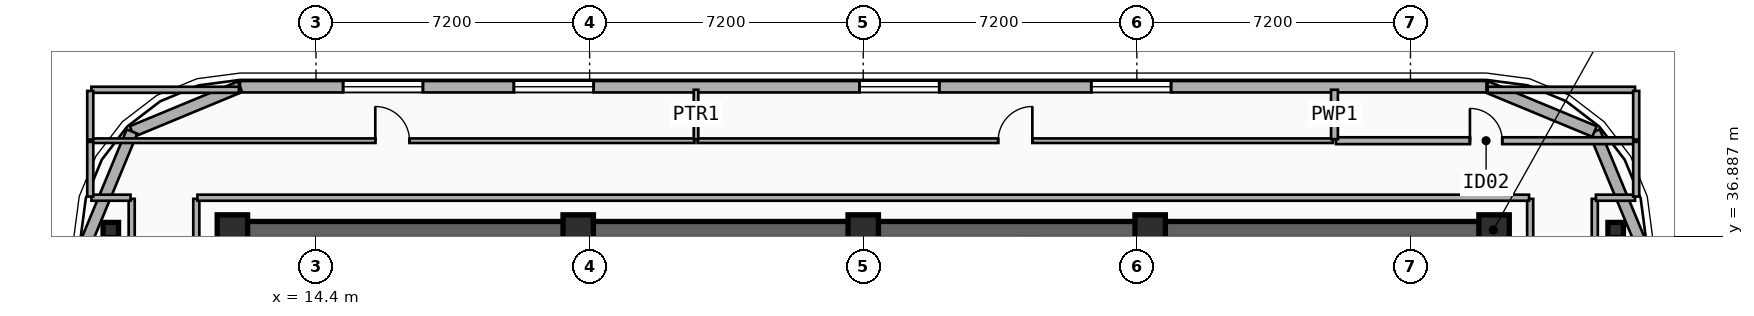
"""IFC4 building model, lengths in metres.
Left out: names, types, materials, properties, quantities, classifications, styles, units other than length and angle.
Written with IfcOpenShell. Run it as: python <this file> out.ifc"""

import sys

from ifc_helpers import new_model, si_unit, direction, frame, frame_2d, origin, origin_2d, place, context, subcontext, project, spatial, rectangle, i_section, extrude, element, fill, save


model = new_model("IFC4")
c1 = context("Model", 3, precision=1e-05, world=origin(), true_north=direction((0.0, 1.0)))
c2 = subcontext(c1, "Body", "Model", "MODEL_VIEW")
j1 = project(units=[si_unit("LENGTHUNIT", "METRE"), si_unit("PLANEANGLEUNIT", "RADIAN")], contexts=[c1])
p1 = place(None, origin())
s1 = spatial("IfcSite", under=j1, at=p1, CompositionType="ELEMENT")
p2 = place(p1, origin())
s2 = spatial("IfcBuilding", under=s1, at=p2, CompositionType="ELEMENT")
p3 = place(p2, frame((0.0, 0.0, 262.1)))
s3 = spatial("IfcBuildingStorey", under=s2, at=p3, CompositionType="ELEMENT", Elevation=262.1)
p4 = place(p3, frame((12.15, 37.05, 0.0), z_axis=(0.0, 0.0, 1.0), x_axis=(1.0, 0.0, 0.0)))
e1 = element("IfcWall", 1, at=p4, inside=s3, PredefinedType="SHEAR", context=c2, shape_type="SweptSolid", body=[
    extrude(rectangle(XDim=33.23, YDim=0.45, at=frame_2d((16.615, 0.0))), origin(), (0.0, 0.0, 1.0), 3.7),
])
for number, where, z_axis, x_axis in (
    (2, (12.2, 37.05, 0.0), (0.0, 0.0, 1.0), (1.0, 0.0, 0.0)),
    (3, (21.3, 37.05, 0.0), (0.0, 0.0, 1.0), (1.0, 0.0, 0.0)),
    (4, (28.8, 37.05, 0.0), (0.0, 0.0, 1.0), (1.0, 0.0, 0.0)),
    (5, (36.35, 37.05, 0.0), (0.0, 0.0, 1.0), (1.0, 0.0, 0.0)),
    (6, (45.4, 37.05, 0.0), (0.0, 0.0, 1.0), (1.0, 0.0, 0.0)),
):
    element("IfcColumn", number, at=place(p3, frame(where, z_axis=z_axis, x_axis=x_axis)), inside=s3, PredefinedType="COLUMN", context=c2, shape_type="SweptSolid", body=[
        extrude(rectangle(XDim=0.8, YDim=0.8, at=origin_2d()), origin(), (0.0, 0.0, 1.0), 3.7),
    ])
for number, where, z_axis, x_axis in (
    (7, (9.0, 37.05, 0.0), (0.0, 0.0, 1.0), (1.0, 0.0, 0.0)),
    (8, (48.6, 37.05, 0.0), (0.0, 0.0, 1.0), (1.0, 0.0, 0.0)),
):
    element("IfcColumn", number, at=place(p3, frame(where, z_axis=z_axis, x_axis=x_axis)), inside=s3, PredefinedType="COLUMN", context=c2, shape_type="SweptSolid", body=[
        extrude(i_section(OverallWidth=0.408, OverallDepth=0.4, WebThickness=0.025, FlangeThickness=0.039, FilletRadius=0.015, at=origin_2d()), origin(), (0.0, 0.0, 1.0), 3.7),
    ])
for number, where, z_axis, x_axis in (
    (9, (48.042, 39.643, 0.0), (0.0, 0.0, 1.0), (0.383, -0.924, 0.0)),
    (10, (45.2, 40.82, 0.0), (0.0, 0.0, 1.0), (0.924, -0.383, 0.0)),
):
    element("IfcWall", number, at=place(p3, frame(where, z_axis=z_axis, x_axis=x_axis)), inside=s3, PredefinedType="SOLIDWALL", context=c2, shape_type="SweptSolid", body=[
        extrude(rectangle(XDim=3.077, YDim=0.3, at=frame_2d((1.538, 0.0))), origin(), (0.0, 0.0, 1.0), 3.42),
    ])
p5 = place(p3, frame((12.4, 40.82, 0.0), z_axis=(0.0, 0.0, 1.0), x_axis=(1.0, 0.0, 0.0)))
e11 = element("IfcWall", 11, at=p5, inside=s3, PredefinedType="SOLIDWALL", context=c2, shape_type="SweptSolid", body=[
    extrude(rectangle(XDim=32.8, YDim=0.3, at=frame_2d((16.4, 0.0))), origin(), (0.0, 0.0, 1.0), 3.42),
])
p6 = place(p5, frame((2.713, 0.0, 0.75)))
e12 = element("IfcOpeningElement", 12, at=p6, cuts=e11, PredefinedType="OPENING", context=c2, shape_type="SweptSolid", body=[
    extrude(rectangle(XDim=2.1, YDim=2.1, at=frame_2d((1.05, 1.05))), frame((0.0, 0.16, 0.0), z_axis=(0.0, -1.0, 0.0), x_axis=(1.0, 0.0, 0.0)), (0.0, 0.0, 1.0), 0.32),
])
p7 = place(p5, frame((7.207, 0.0, 0.75)))
e13 = element("IfcOpeningElement", 13, at=p7, cuts=e11, PredefinedType="OPENING", context=c2, shape_type="SweptSolid", body=[
    extrude(rectangle(XDim=2.1, YDim=2.1, at=frame_2d((1.05, 1.05))), frame((0.0, 0.16, 0.0), z_axis=(0.0, -1.0, 0.0), x_axis=(1.0, 0.0, 0.0)), (0.0, 0.0, 1.0), 0.32),
])
p8 = place(p5, frame((16.3, 0.0, 0.75)))
e14 = element("IfcOpeningElement", 14, at=p8, cuts=e11, PredefinedType="OPENING", context=c2, shape_type="SweptSolid", body=[
    extrude(rectangle(XDim=2.1, YDim=2.1, at=frame_2d((1.05, 1.05))), frame((0.0, 0.16, 0.0), z_axis=(0.0, -1.0, 0.0), x_axis=(1.0, 0.0, 0.0)), (0.0, 0.0, 1.0), 0.32),
])
p9 = place(p5, frame((22.4, 0.0, 0.75)))
e15 = element("IfcOpeningElement", 15, at=p9, cuts=e11, PredefinedType="OPENING", context=c2, shape_type="SweptSolid", body=[
    extrude(rectangle(XDim=2.1, YDim=2.1, at=frame_2d((1.05, 1.05))), frame((0.0, 0.16, 0.0), z_axis=(0.0, -1.0, 0.0), x_axis=(1.0, 0.0, 0.0)), (0.0, 0.0, 1.0), 0.32),
])
for number, where, z_axis, x_axis in (
    (16, (9.557, 39.643, 0.0), (0.0, 0.0, 1.0), (0.924, 0.383, 0.0)),
    (17, (8.38, 36.8, 0.0), (0.0, 0.0, 1.0), (0.383, 0.924, 0.0)),
):
    element("IfcWall", number, at=place(p3, frame(where, z_axis=z_axis, x_axis=x_axis)), inside=s3, PredefinedType="SOLIDWALL", context=c2, shape_type="SweptSolid", body=[
        extrude(rectangle(XDim=3.077, YDim=0.3, at=frame_2d((1.538, 0.0))), origin(), (0.0, 0.0, 1.0), 3.42),
    ])
p10 = place(p3, frame((8.46, 39.4, 0.0), z_axis=(0.0, 0.0, 1.0), x_axis=(1.0, 0.0, 0.0)))
e18 = element("IfcWall", 18, at=p10, inside=s3, PredefinedType="PARTITIONING", context=c2, shape_type="SweptSolid", body=[
    extrude(rectangle(XDim=15.9, YDim=0.12, at=frame_2d((7.95, 0.0))), origin(), (0.0, 0.0, 1.0), 3.42),
])
p11 = place(p10, frame((7.5, 0.0, 0.0)))
e19 = element("IfcOpeningElement", 19, at=p11, cuts=e18, PredefinedType="OPENING", context=c2, shape_type="SweptSolid", body=[
    extrude(rectangle(XDim=0.9, YDim=2.1, at=frame_2d((0.45, 1.05))), frame((0.0, 0.07, 0.0), z_axis=(0.0, -1.0, 0.0), x_axis=(1.0, 0.0, 0.0)), (0.0, 0.0, 1.0), 0.14),
])
p12 = place(p3, frame((24.44, 39.4, 0.0), z_axis=(0.0, 0.0, 1.0), x_axis=(1.0, 0.0, 0.0)))
e20 = element("IfcWall", 20, at=p12, inside=s3, PredefinedType="PARTITIONING", context=c2, shape_type="SweptSolid", body=[
    extrude(rectangle(XDim=16.72, YDim=0.12, at=frame_2d((8.36, 0.0))), origin(), (0.0, 0.0, 1.0), 3.42),
])
p13 = place(p12, frame((7.91, 0.0, 0.0)))
e21 = element("IfcOpeningElement", 21, at=p13, cuts=e20, PredefinedType="OPENING", context=c2, shape_type="SweptSolid", body=[
    extrude(rectangle(XDim=0.9, YDim=2.1, at=frame_2d((0.45, 1.05))), frame((0.0, 0.07, 0.0), z_axis=(0.0, -1.0, 0.0), x_axis=(1.0, 0.0, 0.0)), (0.0, 0.0, 1.0), 0.14),
])
p14 = place(p3, frame((41.24, 39.4, 0.0), z_axis=(0.0, 0.0, 1.0), x_axis=(1.0, 0.0, 0.0)))
e22 = element("IfcWall", 22, at=p14, inside=s3, PredefinedType="PLUMBINGWALL", context=c2, shape_type="SweptSolid", body=[
    extrude(rectangle(XDim=7.9, YDim=0.18, at=frame_2d((3.95, 0.0))), origin(), (0.0, 0.0, 1.0), 3.42),
])
p15 = place(p14, frame((3.525, 0.0, 0.0)))
e23 = element("IfcOpeningElement", 23, at=p15, cuts=e22, PredefinedType="OPENING", context=c2, shape_type="SweptSolid", body=[
    extrude(rectangle(XDim=0.85, YDim=2.1, at=frame_2d((0.425, 1.05))), frame((0.0, 0.1, 0.0), z_axis=(0.0, -1.0, 0.0), x_axis=(1.0, 0.0, 0.0)), (0.0, 0.0, 1.0), 0.2),
])
p16 = place(p3, frame((24.4, 39.44, 0.0), z_axis=(0.0, 0.0, 1.0), x_axis=(0.0, 1.0, 0.0)))
e24 = element("IfcWall", 24, at=p16, inside=s3, PredefinedType="PARTITIONING", context=c2, shape_type="SweptSolid", body=[
    extrude(rectangle(XDim=1.3, YDim=0.12, at=frame_2d((0.65, 0.0))), origin(), (0.0, 0.0, 1.0), 3.42),
])
p17 = place(p3, frame((41.2, 39.44, 0.0), z_axis=(0.0, 0.0, 1.0), x_axis=(0.0, 1.0, 0.0)))
e25 = element("IfcWall", 25, at=p17, inside=s3, PredefinedType="PLUMBINGWALL", context=c2, shape_type="SweptSolid", body=[
    extrude(rectangle(XDim=1.3, YDim=0.18, at=frame_2d((0.65, 0.0))), origin(), (0.0, 0.0, 1.0), 3.42),
])
for number, where, z_axis, x_axis in (
    (26, (9.55, 27.63, 0.0), (0.0, 0.0, 1.0), (0.0, 1.0, 0.0)),
    (27, (11.25, 27.63, 0.0), (0.0, 0.0, 1.0), (0.0, 1.0, 0.0)),
    (28, (46.35, 27.63, 0.0), (0.0, 0.0, 1.0), (0.0, 1.0, 0.0)),
    (29, (48.05, 27.63, 0.0), (0.0, 0.0, 1.0), (0.0, 1.0, 0.0)),
):
    element("IfcWall", number, at=place(p3, frame(where, z_axis=z_axis, x_axis=x_axis)), inside=s3, PredefinedType="PARTITIONING", context=c2, shape_type="SweptSolid", body=[
        extrude(rectangle(XDim=10.24, YDim=0.16, at=frame_2d((5.12, 0.0))), origin(), (0.0, 0.0, 1.0), 2.9),
    ])
p18 = place(p3, frame((8.49, 37.9, 0.0), z_axis=(0.0, 0.0, 1.0), x_axis=(1.0, 0.0, 0.0)))
e30 = element("IfcWall", 30, at=p18, inside=s3, PredefinedType="PARTITIONING", context=c2, shape_type="SweptSolid", body=[
    extrude(rectangle(XDim=1.03, YDim=0.16, at=frame_2d((0.515, 0.0))), origin(), (0.0, 0.0, 1.0), 3.42),
])
p19 = place(p3, frame((11.28, 37.9, 0.0), z_axis=(0.0, 0.0, 1.0), x_axis=(1.0, 0.0, 0.0)))
e31 = element("IfcWall", 31, at=p19, inside=s3, PredefinedType="PARTITIONING", context=c2, shape_type="SweptSolid", body=[
    extrude(rectangle(XDim=35.04, YDim=0.16, at=frame_2d((17.52, 0.0))), origin(), (0.0, 0.0, 1.0), 3.42),
])
p20 = place(p3, frame((48.08, 37.9, 0.0), z_axis=(0.0, 0.0, 1.0), x_axis=(1.0, 0.0, 0.0)))
e32 = element("IfcWall", 32, at=p20, inside=s3, PredefinedType="PARTITIONING", context=c2, shape_type="SweptSolid", body=[
    extrude(rectangle(XDim=1.03, YDim=0.16, at=frame_2d((0.515, 0.0))), origin(), (0.0, 0.0, 1.0), 3.42),
])
for number, where, z_axis, x_axis in (
    (33, (8.46, 37.93, 0.0), (0.0, 0.0, 1.0), (0.0, 1.0, 0.0)),
    (34, (49.14, 37.93, 0.0), (0.0, 0.0, 1.0), (0.0, 1.0, 0.0)),
):
    element("IfcWall", number, at=place(p3, frame(where, z_axis=z_axis, x_axis=x_axis)), inside=s3, PredefinedType="PARTITIONING", context=c2, shape_type="SweptSolid", body=[
        extrude(rectangle(XDim=1.44, YDim=0.16, at=frame_2d((0.72, 0.0))), origin(), (0.0, 0.0, 1.0), 3.42),
    ])
p21 = place(p3, frame((8.49, 40.74, 0.0), z_axis=(0.0, 0.0, 1.0), x_axis=(1.0, 0.0, 0.0)))
e35 = element("IfcWall", 35, at=p21, inside=s3, PredefinedType="PARTITIONING", context=c2, shape_type="SweptSolid", body=[
    extrude(rectangle(XDim=3.88, YDim=0.16, at=frame_2d((1.94, 0.0))), origin(), (0.0, 0.0, 1.0), 3.42),
])
p22 = place(p3, frame((8.46, 39.43, 0.0), z_axis=(0.0, 0.0, 1.0), x_axis=(0.0, 1.0, 0.0)))
e36 = element("IfcWall", 36, at=p22, inside=s3, PredefinedType="PARTITIONING", context=c2, shape_type="SweptSolid", body=[
    extrude(rectangle(XDim=1.28, YDim=0.16, at=frame_2d((0.64, 0.0))), origin(), (0.0, 0.0, 1.0), 3.42),
])
p23 = place(p3, frame((45.23, 40.74, 0.0), z_axis=(0.0, 0.0, 1.0), x_axis=(1.0, 0.0, 0.0)))
e37 = element("IfcWall", 37, at=p23, inside=s3, PredefinedType="PARTITIONING", context=c2, shape_type="SweptSolid", body=[
    extrude(rectangle(XDim=3.88, YDim=0.16, at=frame_2d((1.94, 0.0))), origin(), (0.0, 0.0, 1.0), 3.42),
])
p24 = place(p3, frame((49.14, 39.43, 0.0), z_axis=(0.0, 0.0, 1.0), x_axis=(0.0, 1.0, 0.0)))
e38 = element("IfcWall", 38, at=p24, inside=s3, PredefinedType="PARTITIONING", context=c2, shape_type="SweptSolid", body=[
    extrude(rectangle(XDim=1.28, YDim=0.16, at=frame_2d((0.64, 0.0))), origin(), (0.0, 0.0, 1.0), 3.42),
])
p25 = place(p6, origin())
e39 = element("IfcWindow", 39, at=p25, inside=s3, PartitioningType="SINGLE_PANEL", PredefinedType="WINDOW", context=c2, shape_type="SweptSolid", body=[
    extrude(rectangle(XDim=2.1, YDim=2.1, at=frame_2d((1.05, 1.05))), frame((0.0, 0.03, 0.0), z_axis=(0.0, -1.0, 0.0), x_axis=(1.0, 0.0, 0.0)), (0.0, 0.0, 1.0), 0.06),
])
fill(e12, e39)
p26 = place(p7, origin())
e40 = element("IfcWindow", 40, at=p26, inside=s3, PartitioningType="SINGLE_PANEL", PredefinedType="WINDOW", context=c2, shape_type="SweptSolid", body=[
    extrude(rectangle(XDim=2.1, YDim=2.1, at=frame_2d((1.05, 1.05))), frame((0.0, 0.03, 0.0), z_axis=(0.0, -1.0, 0.0), x_axis=(1.0, 0.0, 0.0)), (0.0, 0.0, 1.0), 0.06),
])
fill(e13, e40)
p27 = place(p8, origin())
e41 = element("IfcWindow", 41, at=p27, inside=s3, PartitioningType="SINGLE_PANEL", PredefinedType="WINDOW", context=c2, shape_type="SweptSolid", body=[
    extrude(rectangle(XDim=2.1, YDim=2.1, at=frame_2d((1.05, 1.05))), frame((0.0, 0.03, 0.0), z_axis=(0.0, -1.0, 0.0), x_axis=(1.0, 0.0, 0.0)), (0.0, 0.0, 1.0), 0.06),
])
fill(e14, e41)
p28 = place(p9, origin())
e42 = element("IfcWindow", 42, at=p28, inside=s3, PartitioningType="SINGLE_PANEL", PredefinedType="WINDOW", context=c2, shape_type="SweptSolid", body=[
    extrude(rectangle(XDim=2.1, YDim=2.1, at=frame_2d((1.05, 1.05))), frame((0.0, 0.03, 0.0), z_axis=(0.0, -1.0, 0.0), x_axis=(1.0, 0.0, 0.0)), (0.0, 0.0, 1.0), 0.06),
])
fill(e15, e42)
p29 = place(p11, origin())
e43 = element("IfcDoor", 43, at=p29, inside=s3, OperationType="SINGLE_SWING_LEFT", PredefinedType="DOOR", context=c2, shape_type="SweptSolid", body=[
    extrude(rectangle(XDim=0.9, YDim=2.1, at=frame_2d((0.45, 1.05))), frame((0.0, 0.025, 0.0), z_axis=(0.0, -1.0, 0.0), x_axis=(1.0, 0.0, 0.0)), (0.0, 0.0, 1.0), 0.05),
])
fill(e19, e43)
p30 = place(p13, origin())
e44 = element("IfcDoor", 44, at=p30, inside=s3, OperationType="SINGLE_SWING_RIGHT", PredefinedType="DOOR", context=c2, shape_type="SweptSolid", body=[
    extrude(rectangle(XDim=0.9, YDim=2.1, at=frame_2d((0.45, 1.05))), frame((0.0, 0.025, 0.0), z_axis=(0.0, -1.0, 0.0), x_axis=(1.0, 0.0, 0.0)), (0.0, 0.0, 1.0), 0.05),
])
fill(e21, e44)
p31 = place(p15, origin())
e45 = element("IfcDoor", 45, at=p31, inside=s3, OperationType="SINGLE_SWING_LEFT", PredefinedType="DOOR", context=c2, shape_type="SweptSolid", body=[
    extrude(rectangle(XDim=0.85, YDim=2.1, at=frame_2d((0.425, 1.05))), frame((0.0, 0.025, 0.0), z_axis=(0.0, -1.0, 0.0), x_axis=(1.0, 0.0, 0.0)), (0.0, 0.0, 1.0), 0.05),
])
fill(e23, e45)
save(model, sys.argv[1])
